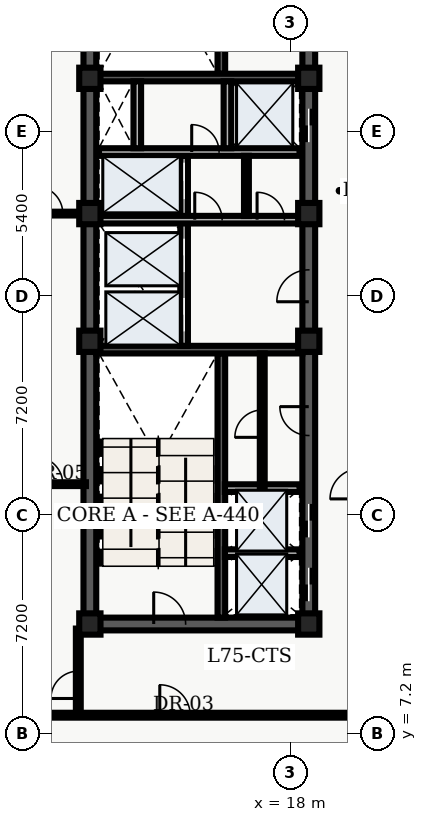
"""IFC4 building model, lengths in metres.
Left out: names, types, materials, properties, quantities, classifications, styles, units other than length and angle.
Written with IfcOpenShell. Run it as: python <this file> out.ifc"""

import sys

from ifc_helpers import new_model, entity, si_unit, converted_unit, direction, frame, origin_with_axes, origin_2d_with_axis, place, context, subcontext, project, spatial, polyline, rectangle, outline, extrude, element, fill, save


model = new_model("IFC4")
c1 = context("Model", 3, precision=1e-05, world=origin_with_axes(), true_north=direction((0.0, 1.0)))
c2 = subcontext(c1, "Body", "Model", "MODEL_VIEW")
j1 = project(units=[si_unit("LENGTHUNIT", "METRE"), converted_unit("PLANEANGLEUNIT", "DEGREE", entity("IfcPlaneAngleMeasure", 0.017), si_unit("PLANEANGLEUNIT", "RADIAN"), dimensions=[0, 0, 0, 0, 0, 0, 0])], contexts=[c1])
p1 = place(None, origin_with_axes())
s1 = spatial("IfcSite", under=j1, at=p1, CompositionType="ELEMENT")
p2 = place(p1, origin_with_axes())
s2 = spatial("IfcBuilding", under=s1, at=p2, CompositionType="ELEMENT")
p3 = place(p2, frame((0.0, 0.0, 303.6), z_axis=(0.0, 0.0, 1.0), x_axis=(1.0, 0.0, 0.0)))
s3 = spatial("IfcBuildingStorey", under=s2, at=p3, CompositionType="ELEMENT", Elevation=303.6)
p4 = place(p3, frame((11.4, 10.8, 0.0), z_axis=(0.0, 0.0, 1.0), x_axis=(0.0, 1.0, 0.0)))
e1 = element("IfcWall", 1, at=p4, inside=s3, PredefinedType="SHEAR", context=c2, shape_type="SweptSolid", body=[
    extrude(outline(polyline([(0.0, -0.21), (27.0, -0.21), (27.0, 0.21), (0.0, 0.21), (0.0, -0.21)])), origin_with_axes(), (0.0, 0.0, 1.0), 4.84),
])
p5 = place(p3, frame((11.4, 10.8, 0.0), z_axis=(0.0, 0.0, 1.0), x_axis=(1.0, 0.0, 0.0)))
e2 = element("IfcWall", 2, at=p5, inside=s3, PredefinedType="SHEAR", context=c2, shape_type="SweptSolid", body=[
    extrude(outline(polyline([(0.0, -0.21), (7.2, -0.21), (7.2, 0.21), (0.0, 0.21), (0.0, -0.21)])), origin_with_axes(), (0.0, 0.0, 1.0), 4.84),
])
p6 = place(p5, frame((2.625, 0.0, 0.0), z_axis=(0.0, 0.0, 1.0), x_axis=(1.0, 0.0, 0.0)))
e3 = element("IfcOpeningElement", 3, at=p6, cuts=e2, PredefinedType="OPENING", context=c2, shape_type="SweptSolid", body=[
    extrude(rectangle(XDim=1.05, YDim=0.44, at=origin_2d_with_axis()), origin_with_axes(), (0.0, 0.0, 1.0), 2.15),
])
p7 = place(p3, frame((18.6, 10.8, 0.0), z_axis=(0.0, 0.0, 1.0), x_axis=(0.0, 1.0, 0.0)))
e4 = element("IfcWall", 4, at=p7, inside=s3, PredefinedType="SHEAR", context=c2, shape_type="SweptSolid", body=[
    extrude(outline(polyline([(0.0, -0.21), (13.5, -0.21), (13.5, 0.21), (0.0, 0.21), (0.0, -0.21)])), origin_with_axes(), (0.0, 0.0, 1.0), 4.84),
])
p8 = place(p7, frame((1.3, 0.0, 0.0), z_axis=(0.0, 0.0, 1.0), x_axis=(1.0, 0.0, 0.0)))
e5 = element("IfcOpeningElement", 5, at=p8, cuts=e4, PredefinedType="OPENING", context=c2, shape_type="SweptSolid", body=[
    extrude(rectangle(XDim=1.1, YDim=0.44, at=origin_2d_with_axis()), origin_with_axes(), (0.0, 0.0, 1.0), 2.15),
])
p9 = place(p7, frame((3.4, 0.0, 0.0), z_axis=(0.0, 0.0, 1.0), x_axis=(1.0, 0.0, 0.0)))
e6 = element("IfcOpeningElement", 6, at=p9, cuts=e4, PredefinedType="OPENING", context=c2, shape_type="SweptSolid", body=[
    extrude(rectangle(XDim=1.1, YDim=0.44, at=origin_2d_with_axis()), origin_with_axes(), (0.0, 0.0, 1.0), 2.15),
])
p10 = place(p7, frame((11.125, 0.0, 0.0), z_axis=(0.0, 0.0, 1.0), x_axis=(1.0, 0.0, 0.0)))
e7 = element("IfcOpeningElement", 7, at=p10, cuts=e4, PredefinedType="OPENING", context=c2, shape_type="SweptSolid", body=[
    extrude(rectangle(XDim=1.05, YDim=0.44, at=origin_2d_with_axis()), origin_with_axes(), (0.0, 0.0, 1.0), 2.15),
])
p11 = place(p7, frame((6.675, 0.0, 0.0), z_axis=(0.0, 0.0, 1.0), x_axis=(1.0, 0.0, 0.0)))
e8 = element("IfcOpeningElement", 8, at=p11, cuts=e4, PredefinedType="OPENING", context=c2, shape_type="SweptSolid", body=[
    extrude(rectangle(XDim=0.95, YDim=0.44, at=origin_2d_with_axis()), origin_with_axes(), (0.0, 0.0, 1.0), 2.15),
])
p12 = place(p3, frame((18.6, 24.3, 0.0), z_axis=(0.0, 0.0, 1.0), x_axis=(0.0, 1.0, 0.0)))
e9 = element("IfcWall", 9, at=p12, inside=s3, PredefinedType="SHEAR", context=c2, shape_type="SweptSolid", body=[
    extrude(outline(polyline([(0.0, -0.21), (13.5, -0.21), (13.5, 0.21), (0.0, 0.21), (0.0, -0.21)])), origin_with_axes(), (0.0, 0.0, 1.0), 4.84),
])
p13 = place(p12, frame((2.9, 0.0, 0.0), z_axis=(0.0, 0.0, 1.0), x_axis=(1.0, 0.0, 0.0)))
e10 = element("IfcOpeningElement", 10, at=p13, cuts=e9, PredefinedType="OPENING", context=c2, shape_type="SweptSolid", body=[
    extrude(rectangle(XDim=1.1, YDim=0.44, at=origin_2d_with_axis()), origin_with_axes(), (0.0, 0.0, 1.0), 2.15),
])
p14 = place(p12, frame((6.725, 0.0, 0.0), z_axis=(0.0, 0.0, 1.0), x_axis=(1.0, 0.0, 0.0)))
e11 = element("IfcOpeningElement", 11, at=p14, cuts=e9, PredefinedType="OPENING", context=c2, shape_type="SweptSolid", body=[
    extrude(rectangle(XDim=1.05, YDim=0.44, at=origin_2d_with_axis()), origin_with_axes(), (0.0, 0.0, 1.0), 2.15),
])
p15 = place(p12, frame((11.125, 0.0, 0.0), z_axis=(0.0, 0.0, 1.0), x_axis=(1.0, 0.0, 0.0)))
e12 = element("IfcOpeningElement", 12, at=p15, cuts=e9, PredefinedType="OPENING", context=c2, shape_type="SweptSolid", body=[
    extrude(rectangle(XDim=1.05, YDim=0.44, at=origin_2d_with_axis()), origin_with_axes(), (0.0, 0.0, 1.0), 2.15),
])
p16 = place(p3, frame((15.725, 11.01, 0.0), z_axis=(0.0, 0.0, 1.0), x_axis=(0.0, 1.0, 0.0)))
e13 = element("IfcWall", 13, at=p16, inside=s3, PredefinedType="SHEAR", context=c2, shape_type="SweptSolid", body=[
    extrude(outline(polyline([(0.0, -0.125), (8.69, -0.125), (8.69, 0.125), (0.0, 0.125), (0.0, -0.125)])), origin_with_axes(), (0.0, 0.0, 1.0), 4.84),
])
p17 = place(p3, frame((11.61, 19.825, 0.0), z_axis=(0.0, 0.0, 1.0), x_axis=(1.0, 0.0, 0.0)))
e14 = element("IfcWall", 14, at=p17, inside=s3, PredefinedType="SHEAR", context=c2, shape_type="SweptSolid", body=[
    extrude(outline(polyline([(0.0, -0.125), (6.78, -0.125), (6.78, 0.125), (0.0, 0.125), (0.0, -0.125)])), origin_with_axes(), (0.0, 0.0, 1.0), 4.84),
])
p18 = place(p3, frame((15.725, 28.9, 0.0), z_axis=(0.0, 0.0, 1.0), x_axis=(0.0, 1.0, 0.0)))
e15 = element("IfcWall", 15, at=p18, inside=s3, PredefinedType="SHEAR", context=c2, shape_type="SweptSolid", body=[
    extrude(outline(polyline([(0.0, -0.125), (8.69, -0.125), (8.69, 0.125), (0.0, 0.125), (0.0, -0.125)])), origin_with_axes(), (0.0, 0.0, 1.0), 4.84),
])
p19 = place(p3, frame((11.61, 28.775, 0.0), z_axis=(0.0, 0.0, 1.0), x_axis=(1.0, 0.0, 0.0)))
e16 = element("IfcWall", 16, at=p19, inside=s3, PredefinedType="SHEAR", context=c2, shape_type="SweptSolid", body=[
    extrude(outline(polyline([(0.0, -0.125), (6.78, -0.125), (6.78, 0.125), (0.0, 0.125), (0.0, -0.125)])), origin_with_axes(), (0.0, 0.0, 1.0), 4.84),
])
p20 = place(p3, frame((14.5, 19.95, 0.0), z_axis=(0.0, 0.0, 1.0), x_axis=(0.0, 1.0, 0.0)))
e17 = element("IfcWall", 17, at=p20, inside=s3, PredefinedType="SOLIDWALL", context=c2, shape_type="SweptSolid", body=[
    extrude(outline(polyline([(0.0, -0.125), (6.25, -0.125), (6.25, 0.125), (0.0, 0.125), (0.0, -0.125)])), origin_with_axes(), (0.0, 0.0, 1.0), 3.6),
])
p21 = place(p20, frame((1.025, 0.0, 0.0), z_axis=(0.0, 0.0, 1.0), x_axis=(1.0, 0.0, 0.0)))
e18 = element("IfcOpeningElement", 18, at=p21, cuts=e17, PredefinedType="OPENING", context=c2, shape_type="SweptSolid", body=[
    extrude(rectangle(XDim=1.1, YDim=0.27, at=origin_2d_with_axis()), origin_with_axes(), (0.0, 0.0, 1.0), 2.15),
])
p22 = place(p20, frame((2.975, 0.0, 0.0), z_axis=(0.0, 0.0, 1.0), x_axis=(1.0, 0.0, 0.0)))
e19 = element("IfcOpeningElement", 19, at=p22, cuts=e17, PredefinedType="OPENING", context=c2, shape_type="SweptSolid", body=[
    extrude(rectangle(XDim=1.1, YDim=0.27, at=origin_2d_with_axis()), origin_with_axes(), (0.0, 0.0, 1.0), 2.15),
])
p23 = place(p20, frame((5.425, 0.0, 0.0), z_axis=(0.0, 0.0, 1.0), x_axis=(1.0, 0.0, 0.0)))
e20 = element("IfcOpeningElement", 20, at=p23, cuts=e17, PredefinedType="OPENING", context=c2, shape_type="SweptSolid", body=[
    extrude(rectangle(XDim=1.2, YDim=0.27, at=origin_2d_with_axis()), origin_with_axes(), (0.0, 0.0, 1.0), 2.15),
])
p24 = place(p3, frame((11.7, 24.1, 0.0), z_axis=(0.0, 0.0, 1.0), x_axis=(1.0, 0.0, 0.0)))
e21 = element("IfcWall", 21, at=p24, inside=s3, PredefinedType="SOLIDWALL", context=c2, shape_type="SweptSolid", body=[
    extrude(outline(polyline([(0.0, -0.125), (6.6, -0.125), (6.6, 0.125), (0.0, 0.125), (0.0, -0.125)])), origin_with_axes(), (0.0, 0.0, 1.0), 3.6),
])
p25 = place(p24, frame((3.6, 0.0, 0.0), z_axis=(0.0, 0.0, 1.0), x_axis=(1.0, 0.0, 0.0)))
e22 = element("IfcOpeningElement", 22, at=p25, cuts=e21, PredefinedType="OPENING", context=c2, shape_type="SweptSolid", body=[
    extrude(rectangle(XDim=0.9, YDim=0.27, at=origin_2d_with_axis()), origin_with_axes(), (0.0, 0.0, 1.0), 2.15),
])
p26 = place(p24, frame((5.65, 0.0, 0.0), z_axis=(0.0, 0.0, 1.0), x_axis=(1.0, 0.0, 0.0)))
e23 = element("IfcOpeningElement", 23, at=p26, cuts=e21, PredefinedType="OPENING", context=c2, shape_type="SweptSolid", body=[
    extrude(rectangle(XDim=0.9, YDim=0.27, at=origin_2d_with_axis()), origin_with_axes(), (0.0, 0.0, 1.0), 2.15),
])
p27 = place(p3, frame((11.7, 26.325, 0.0), z_axis=(0.0, 0.0, 1.0), x_axis=(1.0, 0.0, 0.0)))
e24 = element("IfcWall", 24, at=p27, inside=s3, PredefinedType="SOLIDWALL", context=c2, shape_type="SweptSolid", body=[
    extrude(outline(polyline([(0.0, -0.125), (6.6, -0.125), (6.6, 0.125), (0.0, 0.125), (0.0, -0.125)])), origin_with_axes(), (0.0, 0.0, 1.0), 3.6),
])
p28 = place(p27, frame((3.5, 0.0, 0.0), z_axis=(0.0, 0.0, 1.0), x_axis=(1.0, 0.0, 0.0)))
e25 = element("IfcOpeningElement", 25, at=p28, cuts=e24, PredefinedType="OPENING", context=c2, shape_type="SweptSolid", body=[
    extrude(rectangle(XDim=0.9, YDim=0.27, at=origin_2d_with_axis()), origin_with_axes(), (0.0, 0.0, 1.0), 2.15),
])
for number, where, z_axis, x_axis in (
    (26, (12.96, 26.45, 0.0), (0.0, 0.0, 1.0), (0.0, 1.0, 0.0)),
    (27, (15.925, 26.45, 0.0), (0.0, 0.0, 1.0), (0.0, 1.0, 0.0)),
):
    element("IfcWall", number, at=place(p3, frame(where, z_axis=z_axis, x_axis=x_axis)), inside=s3, PredefinedType="SOLIDWALL", context=c2, shape_type="SweptSolid", body=[
        extrude(outline(polyline([(0.0, -0.125), (2.2, -0.125), (2.2, 0.125), (0.0, 0.125), (0.0, -0.125)])), origin_with_axes(), (0.0, 0.0, 1.0), 3.6),
    ])
for number, where, z_axis, x_axis in (
    (28, (11.4, 10.8, 0.0), (0.0, 0.0, 1.0), (1.0, 0.0, 0.0)),
    (29, (11.4, 20.1, 0.0), (0.0, 0.0, 1.0), (1.0, 0.0, 0.0)),
    (30, (11.4, 24.3, 0.0), (0.0, 0.0, 1.0), (1.0, 0.0, 0.0)),
    (31, (11.4, 28.75, 0.0), (0.0, 0.0, 1.0), (1.0, 0.0, 0.0)),
    (32, (18.6, 10.8, 0.0), (0.0, 0.0, 1.0), (1.0, 0.0, 0.0)),
    (33, (18.6, 20.1, 0.0), (0.0, 0.0, 1.0), (1.0, 0.0, 0.0)),
    (34, (18.6, 24.3, 0.0), (0.0, 0.0, 1.0), (1.0, 0.0, 0.0)),
    (35, (18.6, 28.75, 0.0), (0.0, 0.0, 1.0), (1.0, 0.0, 0.0)),
):
    element("IfcColumn", number, at=place(p3, frame(where, z_axis=z_axis, x_axis=x_axis)), inside=s3, PredefinedType="COLUMN", context=c2, shape_type="SweptSolid", body=[
        extrude(rectangle(XDim=0.7, YDim=0.7, at=origin_2d_with_axis()), origin_with_axes(), (0.0, 0.0, 1.0), 5.1),
    ])
p29 = place(p3, frame((16.55, 24.22, 0.0), z_axis=(0.0, 0.0, 1.0), x_axis=(0.0, 1.0, 0.0)))
e36 = element("IfcWall", 36, at=p29, inside=s3, PredefinedType="PARTITIONING", context=c2, shape_type="SweptSolid", body=[
    extrude(outline(polyline([(0.0, -0.08), (1.98, -0.08), (1.98, 0.08), (0.0, 0.08), (0.0, -0.08)])), origin_with_axes(), (0.0, 0.0, 1.0), 3.2),
])
for number, where, z_axis, x_axis in (
    (37, (15.84, 13.13, 0.0), (0.0, 0.0, 1.0), (1.0, 0.0, 0.0)),
    (38, (15.84, 15.27, 0.0), (0.0, 0.0, 1.0), (1.0, 0.0, 0.0)),
):
    element("IfcWall", number, at=place(p3, frame(where, z_axis=z_axis, x_axis=x_axis)), inside=s3, PredefinedType="SOLIDWALL", context=c2, shape_type="SweptSolid", body=[
        extrude(outline(polyline([(0.0, -0.125), (2.46, -0.125), (2.46, 0.125), (0.0, 0.125), (0.0, -0.125)])), origin_with_axes(), (0.0, 0.0, 1.0), 3.2),
    ])
p30 = place(p3, frame((17.07, 15.34, 0.0), z_axis=(0.0, 0.0, 1.0), x_axis=(0.0, 1.0, 0.0)))
e39 = element("IfcWall", 39, at=p30, inside=s3, PredefinedType="PARTITIONING", context=c2, shape_type="SweptSolid", body=[
    extrude(outline(polyline([(0.0, -0.08), (4.36, -0.08), (4.36, 0.08), (0.0, 0.08), (0.0, -0.08)])), origin_with_axes(), (0.0, 0.0, 1.0), 3.2),
])
p31 = place(p30, frame((2.05, 0.0, 0.0), z_axis=(0.0, 0.0, 1.0), x_axis=(1.0, 0.0, 0.0)))
e40 = element("IfcOpeningElement", 40, at=p31, cuts=e39, PredefinedType="OPENING", context=c2, shape_type="SweptSolid", body=[
    extrude(rectangle(XDim=0.9, YDim=0.18, at=origin_2d_with_axis()), origin_with_axes(), (0.0, 0.0, 1.0), 2.15),
])
p32 = place(p3, frame((8.135, 7.8, 0.0), z_axis=(0.0, 0.0, 1.0), x_axis=(1.0, 0.0, 0.0)))
e41 = element("IfcWall", 41, at=p32, inside=s3, PredefinedType="PARTITIONING", context=c2, shape_type="SweptSolid", body=[
    extrude(outline(polyline([(0.0, -0.08), (12.165, -0.08), (12.165, 0.08), (0.0, 0.08), (0.0, -0.08)])), origin_with_axes(), (0.0, 0.0, 1.0), 3.2),
])
p33 = place(p32, frame((6.065, 0.0, 0.0), z_axis=(0.0, 0.0, 1.0), x_axis=(1.0, 0.0, 0.0)))
e42 = element("IfcOpeningElement", 42, at=p33, cuts=e41, PredefinedType="OPENING", context=c2, shape_type="SweptSolid", body=[
    extrude(rectangle(XDim=1.0, YDim=0.18, at=origin_2d_with_axis()), origin_with_axes(), (0.0, 0.0, 1.0), 2.15),
])
p34 = place(p3, frame((11.02, 7.8, 0.0), z_axis=(0.0, 0.0, 1.0), x_axis=(0.0, 1.0, 0.0)))
e43 = element("IfcWall", 43, at=p34, inside=s3, PredefinedType="PARTITIONING", context=c2, shape_type="SweptSolid", body=[
    extrude(outline(polyline([(0.0, -0.08), (2.85, -0.08), (2.85, 0.08), (0.0, 0.08), (0.0, -0.08)])), origin_with_axes(), (0.0, 0.0, 1.0), 3.2),
])
p35 = place(p34, frame((1.0, 0.0, 0.0), z_axis=(0.0, 0.0, 1.0), x_axis=(1.0, 0.0, 0.0)))
e44 = element("IfcOpeningElement", 44, at=p35, cuts=e43, PredefinedType="OPENING", context=c2, shape_type="SweptSolid", body=[
    extrude(rectangle(XDim=0.9, YDim=0.18, at=origin_2d_with_axis()), origin_with_axes(), (0.0, 0.0, 1.0), 2.15),
])
p36 = place(p3, frame((8.135, 15.4, 0.0), z_axis=(0.0, 0.0, 1.0), x_axis=(1.0, 0.0, 0.0)))
e45 = element("IfcWall", 45, at=p36, inside=s3, PredefinedType="PARTITIONING", context=c2, shape_type="SweptSolid", body=[
    extrude(outline(polyline([(0.0, -0.062), (3.135, -0.062), (3.135, 0.062), (0.0, 0.062), (0.0, -0.062)])), origin_with_axes(), (0.0, 0.0, 1.0), 3.2),
])
p37 = place(p36, frame((1.925, 0.0, 0.0), z_axis=(0.0, 0.0, 1.0), x_axis=(1.0, 0.0, 0.0)))
e46 = element("IfcOpeningElement", 46, at=p37, cuts=e45, PredefinedType="OPENING", context=c2, shape_type="SweptSolid", body=[
    extrude(rectangle(XDim=0.9, YDim=0.145, at=origin_2d_with_axis()), origin_with_axes(), (0.0, 0.0, 1.0), 2.15),
])
p38 = place(p3, frame((8.135, 24.3, 0.0), z_axis=(0.0, 0.0, 1.0), x_axis=(1.0, 0.0, 0.0)))
e47 = element("IfcWall", 47, at=p38, inside=s3, PredefinedType="PARTITIONING", context=c2, shape_type="SweptSolid", body=[
    extrude(outline(polyline([(0.0, -0.062), (3.135, -0.062), (3.135, 0.062), (0.0, 0.062), (0.0, -0.062)])), origin_with_axes(), (0.0, 0.0, 1.0), 3.2),
])
p39 = place(p38, frame((1.925, 0.0, 0.0), z_axis=(0.0, 0.0, 1.0), x_axis=(1.0, 0.0, 0.0)))
e48 = element("IfcOpeningElement", 48, at=p39, cuts=e47, PredefinedType="OPENING", context=c2, shape_type="SweptSolid", body=[
    extrude(rectangle(XDim=0.9, YDim=0.145, at=origin_2d_with_axis()), origin_with_axes(), (0.0, 0.0, 1.0), 2.15),
])
p40 = place(p7, frame((1.3, 0.0, 0.0), z_axis=(0.0, 0.0, 1.0), x_axis=(1.0, 0.0, 0.0)))
e49 = element("IfcDoor", 49, at=p40, inside=s3, OperationType="SLIDING_TO_LEFT", PredefinedType="DOOR", context=c2, shape_type="SweptSolid", body=[
    extrude(rectangle(XDim=1.1, YDim=0.09, at=origin_2d_with_axis()), origin_with_axes(), (0.0, 0.0, 1.0), 2.15),
])
fill(e5, e49)
p41 = place(p7, frame((3.4, 0.0, 0.0), z_axis=(0.0, 0.0, 1.0), x_axis=(1.0, 0.0, 0.0)))
e50 = element("IfcDoor", 50, at=p41, inside=s3, OperationType="SLIDING_TO_RIGHT", PredefinedType="DOOR", context=c2, shape_type="SweptSolid", body=[
    extrude(rectangle(XDim=1.1, YDim=0.09, at=origin_2d_with_axis()), origin_with_axes(), (0.0, 0.0, 1.0), 2.15),
])
fill(e6, e50)
p42 = place(p12, frame((2.9, 0.0, 0.0), z_axis=(0.0, 0.0, 1.0), x_axis=(1.0, 0.0, 0.0)))
e51 = element("IfcDoor", 51, at=p42, inside=s3, OperationType="DOUBLE_DOOR_SLIDING", PredefinedType="DOOR", context=c2, shape_type="SweptSolid", body=[
    extrude(rectangle(XDim=1.1, YDim=0.09, at=origin_2d_with_axis()), origin_with_axes(), (0.0, 0.0, 1.0), 2.15),
])
fill(e10, e51)
p43 = place(p20, frame((1.025, 0.0, 0.0), z_axis=(0.0, 0.0, 1.0), x_axis=(1.0, 0.0, 0.0)))
e52 = element("IfcDoor", 52, at=p43, inside=s3, OperationType="SLIDING_TO_LEFT", PredefinedType="DOOR", context=c2, shape_type="SweptSolid", body=[
    extrude(rectangle(XDim=1.1, YDim=0.09, at=origin_2d_with_axis()), origin_with_axes(), (0.0, 0.0, 1.0), 2.15),
])
fill(e18, e52)
p44 = place(p20, frame((2.975, 0.0, 0.0), z_axis=(0.0, 0.0, 1.0), x_axis=(1.0, 0.0, 0.0)))
e53 = element("IfcDoor", 53, at=p44, inside=s3, OperationType="SLIDING_TO_RIGHT", PredefinedType="DOOR", context=c2, shape_type="SweptSolid", body=[
    extrude(rectangle(XDim=1.1, YDim=0.09, at=origin_2d_with_axis()), origin_with_axes(), (0.0, 0.0, 1.0), 2.15),
])
fill(e19, e53)
p45 = place(p20, frame((5.425, 0.0, 0.0), z_axis=(0.0, 0.0, 1.0), x_axis=(1.0, 0.0, 0.0)))
e54 = element("IfcDoor", 54, at=p45, inside=s3, OperationType="DOUBLE_DOOR_SLIDING", PredefinedType="DOOR", context=c2, shape_type="SweptSolid", body=[
    extrude(rectangle(XDim=1.2, YDim=0.09, at=origin_2d_with_axis()), origin_with_axes(), (0.0, 0.0, 1.0), 2.15),
])
fill(e20, e54)
p46 = place(p5, frame((2.625, 0.0, 0.0), z_axis=(0.0, 0.0, 1.0), x_axis=(1.0, 0.0, 0.0)))
e55 = element("IfcDoor", 55, at=p46, inside=s3, OperationType="SINGLE_SWING_LEFT", PredefinedType="DOOR", context=c2, shape_type="SweptSolid", body=[
    extrude(rectangle(XDim=1.05, YDim=0.09, at=origin_2d_with_axis()), origin_with_axes(), (0.0, 0.0, 1.0), 2.15),
])
fill(e3, e55)
p47 = place(p7, frame((11.125, 0.0, 0.0), z_axis=(0.0, 0.0, 1.0), x_axis=(1.0, 0.0, 0.0)))
e56 = element("IfcDoor", 56, at=p47, inside=s3, OperationType="SINGLE_SWING_LEFT", PredefinedType="DOOR", context=c2, shape_type="SweptSolid", body=[
    extrude(rectangle(XDim=1.05, YDim=0.09, at=origin_2d_with_axis()), origin_with_axes(), (0.0, 0.0, 1.0), 2.15),
])
fill(e7, e56)
p48 = place(p24, frame((3.6, 0.0, 0.0), z_axis=(0.0, 0.0, 1.0), x_axis=(1.0, 0.0, 0.0)))
e57 = element("IfcDoor", 57, at=p48, inside=s3, OperationType="SINGLE_SWING_LEFT", PredefinedType="DOOR", context=c2, shape_type="SweptSolid", body=[
    extrude(rectangle(XDim=0.9, YDim=0.09, at=origin_2d_with_axis()), origin_with_axes(), (0.0, 0.0, 1.0), 2.15),
])
fill(e22, e57)
p49 = place(p24, frame((5.65, 0.0, 0.0), z_axis=(0.0, 0.0, 1.0), x_axis=(1.0, 0.0, 0.0)))
e58 = element("IfcDoor", 58, at=p49, inside=s3, OperationType="SINGLE_SWING_LEFT", PredefinedType="DOOR", context=c2, shape_type="SweptSolid", body=[
    extrude(rectangle(XDim=0.9, YDim=0.09, at=origin_2d_with_axis()), origin_with_axes(), (0.0, 0.0, 1.0), 2.15),
])
fill(e23, e58)
p50 = place(p27, frame((3.5, 0.0, 0.0), z_axis=(0.0, 0.0, 1.0), x_axis=(1.0, 0.0, 0.0)))
e59 = element("IfcDoor", 59, at=p50, inside=s3, OperationType="SINGLE_SWING_LEFT", PredefinedType="DOOR", context=c2, shape_type="SweptSolid", body=[
    extrude(rectangle(XDim=0.9, YDim=0.09, at=origin_2d_with_axis()), origin_with_axes(), (0.0, 0.0, 1.0), 2.15),
])
fill(e25, e59)
p51 = place(p30, frame((2.05, 0.0, 0.0), z_axis=(0.0, 0.0, 1.0), x_axis=(1.0, 0.0, 0.0)))
e60 = element("IfcDoor", 60, at=p51, inside=s3, OperationType="SINGLE_SWING_LEFT", PredefinedType="DOOR", context=c2, shape_type="SweptSolid", body=[
    extrude(rectangle(XDim=0.9, YDim=0.09, at=origin_2d_with_axis()), origin_with_axes(), (0.0, 0.0, 1.0), 2.15),
])
fill(e40, e60)
p52 = place(p7, frame((6.675, 0.0, 0.0), z_axis=(0.0, 0.0, 1.0), x_axis=(1.0, 0.0, 0.0)))
e61 = element("IfcDoor", 61, at=p52, inside=s3, OperationType="SINGLE_SWING_RIGHT", PredefinedType="DOOR", context=c2, shape_type="SweptSolid", body=[
    extrude(rectangle(XDim=0.95, YDim=0.09, at=origin_2d_with_axis()), origin_with_axes(), (0.0, 0.0, 1.0), 2.15),
])
fill(e8, e61)
p53 = place(p36, frame((1.925, 0.0, 0.0), z_axis=(0.0, 0.0, 1.0), x_axis=(1.0, 0.0, 0.0)))
e62 = element("IfcDoor", 62, at=p53, inside=s3, OperationType="SINGLE_SWING_LEFT", PredefinedType="DOOR", context=c2, shape_type="SweptSolid", body=[
    extrude(rectangle(XDim=0.9, YDim=0.075, at=origin_2d_with_axis()), origin_with_axes(), (0.0, 0.0, 1.0), 2.15),
])
fill(e46, e62)
p54 = place(p38, frame((1.925, 0.0, 0.0), z_axis=(0.0, 0.0, 1.0), x_axis=(1.0, 0.0, 0.0)))
e63 = element("IfcDoor", 63, at=p54, inside=s3, OperationType="SINGLE_SWING_LEFT", PredefinedType="DOOR", context=c2, shape_type="SweptSolid", body=[
    extrude(rectangle(XDim=0.9, YDim=0.075, at=origin_2d_with_axis()), origin_with_axes(), (0.0, 0.0, 1.0), 2.15),
])
fill(e48, e63)
p55 = place(p34, frame((1.0, 0.0, 0.0), z_axis=(0.0, 0.0, 1.0), x_axis=(1.0, 0.0, 0.0)))
e64 = element("IfcDoor", 64, at=p55, inside=s3, OperationType="SINGLE_SWING_LEFT", PredefinedType="DOOR", context=c2, shape_type="SweptSolid", body=[
    extrude(rectangle(XDim=0.9, YDim=0.09, at=origin_2d_with_axis()), origin_with_axes(), (0.0, 0.0, 1.0), 2.15),
])
fill(e44, e64)
p56 = place(p32, frame((6.065, 0.0, 0.0), z_axis=(0.0, 0.0, 1.0), x_axis=(1.0, 0.0, 0.0)))
e65 = element("IfcDoor", 65, at=p56, inside=s3, OperationType="SINGLE_SWING_LEFT", PredefinedType="DOOR", context=c2, shape_type="SweptSolid", body=[
    extrude(rectangle(XDim=1.0, YDim=0.09, at=origin_2d_with_axis()), origin_with_axes(), (0.0, 0.0, 1.0), 2.15),
])
fill(e42, e65)
save(model, sys.argv[1])
